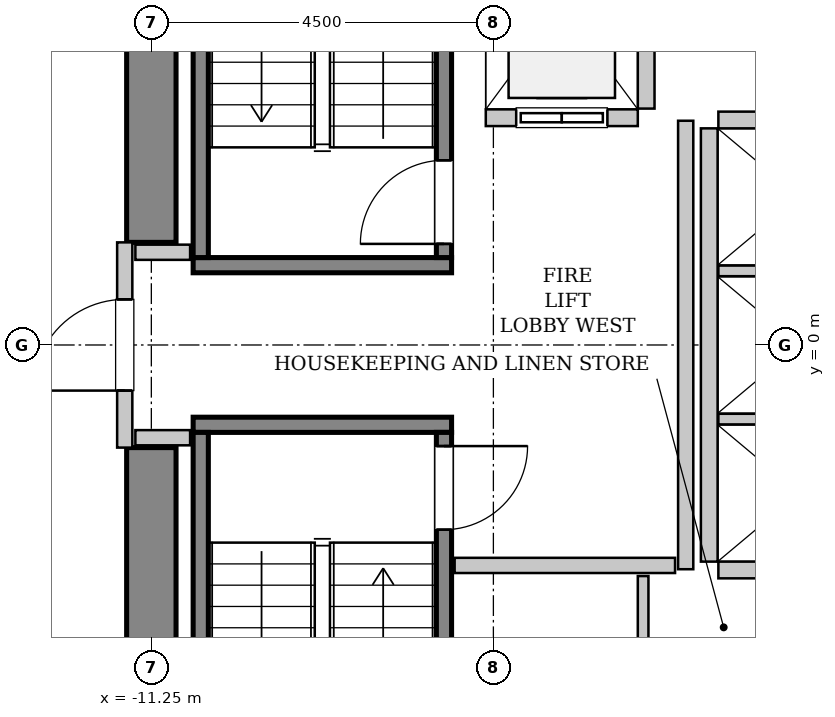
"""IFC4 building model, lengths in metres.
Left out: names, types, materials, properties, quantities, classifications, styles, units other than length and angle.
Written with IfcOpenShell. Run it as: python <this file> out.ifc"""

import sys

from ifc_helpers import new_model, si_unit, direction, frame, frame_2d, origin, place, context, subcontext, project, spatial, rectangle, extrude, source, transform, mapped, element, fill, save


model = new_model("IFC4")
c1 = context("Model", 3, precision=1e-05, world=origin(), true_north=direction((0.0, 1.0)))
c2 = subcontext(c1, "Body", "Model", "MODEL_VIEW")
j1 = project(units=[si_unit("LENGTHUNIT", "METRE"), si_unit("PLANEANGLEUNIT", "RADIAN")], contexts=[c1])
p1 = place(None, origin())
s1 = spatial("IfcSite", under=j1, at=p1, CompositionType="ELEMENT")
p2 = place(p1, origin())
s2 = spatial("IfcBuilding", under=s1, at=p2, CompositionType="ELEMENT")
p3 = place(p2, frame((0.0, 0.0, 74.8)))
s3 = spatial("IfcBuildingStorey", under=s2, at=p3, CompositionType="ELEMENT", Elevation=74.8)
m1 = source(origin(), c2, "Body", "SweptSolid", [
    extrude(rectangle(XDim=7.325, YDim=0.65, at=frame_2d((3.663, 0.0))), origin(), (0.0, 0.0, 1.0), 3.8),
])
for number, where, z_axis, x_axis in (
    (1, (-11.25, -8.675, 0.0), (0.0, 0.0, 1.0), (0.0, 1.0, 0.0)),
    (2, (-11.25, 1.35, 0.0), (0.0, 0.0, 1.0), (0.0, 1.0, 0.0)),
):
    element("IfcWall", number, at=place(p3, frame(where, z_axis=z_axis, x_axis=x_axis)), inside=s3, PredefinedType="SHEAR", context=c2, shape_type="MappedRepresentation", body=[
        mapped(m1, transform((0.0, 0.0, 0.0), x_axis=(1.0, 0.0, 0.0), y_axis=(0.0, 1.0, 0.0), z_axis=(0.0, 0.0, 1.0), scale=1.0)),
    ])
m2 = source(origin(), c2, "Body", "SweptSolid", [
    extrude(rectangle(XDim=3.4, YDim=0.2, at=frame_2d((1.7, 0.0))), origin(), (0.0, 0.0, 1.0), 3.8),
])
p4 = place(p3, frame((-7.3, 1.05, 0.0), z_axis=(0.0, 0.0, 1.0), x_axis=(-1.0, 0.0, 0.0)))
e3 = element("IfcWall", 3, at=p4, inside=s3, PredefinedType="SOLIDWALL", context=c2, shape_type="MappedRepresentation", body=[
    mapped(m2, transform((0.0, 0.0, 0.0), x_axis=(1.0, 0.0, 0.0), y_axis=(0.0, 1.0, 0.0), z_axis=(0.0, 0.0, 1.0), scale=1.0)),
])
m3 = source(origin(), c2, "Body", "SweptSolid", [
    extrude(rectangle(XDim=7.1, YDim=0.2, at=frame_2d((3.55, 0.0))), origin(), (0.0, 0.0, 1.0), 3.8),
])
p5 = place(p3, frame((-7.4, 1.15, 0.0), z_axis=(0.0, 0.0, 1.0), x_axis=(0.0, 1.0, 0.0)))
e4 = element("IfcWall", 4, at=p5, inside=s3, PredefinedType="SOLIDWALL", context=c2, shape_type="MappedRepresentation", body=[
    mapped(m3, transform((0.0, 0.0, 0.0), x_axis=(1.0, 0.0, 0.0), y_axis=(0.0, 1.0, 0.0), z_axis=(0.0, 0.0, 1.0), scale=1.0)),
])
p6 = place(p5, frame((0.18, 0.0, 0.0)))
e5 = element("IfcOpeningElement", 5, at=p6, cuts=e4, PredefinedType="OPENING", context=c2, shape_type="SweptSolid", body=[
    extrude(rectangle(XDim=1.1, YDim=2.15, at=frame_2d((0.55, 1.075))), frame((0.0, 0.11, 0.0), z_axis=(0.0, -1.0, 0.0), x_axis=(1.0, 0.0, 0.0)), (0.0, 0.0, 1.0), 0.22),
])
p7 = place(p3, frame((-10.6, 1.15, 0.0), z_axis=(0.0, 0.0, 1.0), x_axis=(0.0, 1.0, 0.0)))
e6 = element("IfcWall", 6, at=p7, inside=s3, PredefinedType="SOLIDWALL", context=c2, shape_type="MappedRepresentation", body=[
    mapped(m3, transform((0.0, 0.0, 0.0), x_axis=(1.0, 0.0, 0.0), y_axis=(0.0, 1.0, 0.0), z_axis=(0.0, 0.0, 1.0), scale=1.0)),
])
p8 = place(p3, frame((-10.7, -1.05, 0.0), z_axis=(0.0, 0.0, 1.0), x_axis=(1.0, 0.0, 0.0)))
e7 = element("IfcWall", 7, at=p8, inside=s3, PredefinedType="SOLIDWALL", context=c2, shape_type="MappedRepresentation", body=[
    mapped(m2, transform((0.0, 0.0, 0.0), x_axis=(1.0, 0.0, 0.0), y_axis=(0.0, 1.0, 0.0), z_axis=(0.0, 0.0, 1.0), scale=1.0)),
])
p9 = place(p3, frame((-10.6, -1.15, 0.0), z_axis=(0.0, 0.0, 1.0), x_axis=(0.0, -1.0, 0.0)))
e8 = element("IfcWall", 8, at=p9, inside=s3, PredefinedType="SOLIDWALL", context=c2, shape_type="MappedRepresentation", body=[
    mapped(m3, transform((0.0, 0.0, 0.0), x_axis=(1.0, 0.0, 0.0), y_axis=(0.0, 1.0, 0.0), z_axis=(0.0, 0.0, 1.0), scale=1.0)),
])
p10 = place(p3, frame((-7.4, -1.15, 0.0), z_axis=(0.0, 0.0, 1.0), x_axis=(0.0, -1.0, 0.0)))
e9 = element("IfcWall", 9, at=p10, inside=s3, PredefinedType="SOLIDWALL", context=c2, shape_type="MappedRepresentation", body=[
    mapped(m3, transform((0.0, 0.0, 0.0), x_axis=(1.0, 0.0, 0.0), y_axis=(0.0, 1.0, 0.0), z_axis=(0.0, 0.0, 1.0), scale=1.0)),
])
p11 = place(p10, frame((0.18, 0.0, 0.0)))
e10 = element("IfcOpeningElement", 10, at=p11, cuts=e9, PredefinedType="OPENING", context=c2, shape_type="SweptSolid", body=[
    extrude(rectangle(XDim=1.1, YDim=2.15, at=frame_2d((0.55, 1.075))), frame((0.0, 0.11, 0.0), z_axis=(0.0, -1.0, 0.0), x_axis=(1.0, 0.0, 0.0)), (0.0, 0.0, 1.0), 0.22),
])
m4 = source(origin(), c2, "Body", "SweptSolid", [
    extrude(rectangle(XDim=2.0, YDim=0.22, at=frame_2d((1.0, 0.0))), origin(), (0.0, 0.0, 1.0), 3.535),
])
p12 = place(p3, frame((-6.85, 2.99, 0.0), z_axis=(0.0, 0.0, 1.0), x_axis=(1.0, 0.0, 0.0)))
e11 = element("IfcWall", 11, at=p12, inside=s3, PredefinedType="SOLIDWALL", context=c2, shape_type="MappedRepresentation", body=[
    mapped(m4, transform((0.0, 0.0, 0.0), x_axis=(1.0, 0.0, 0.0), y_axis=(0.0, 1.0, 0.0), z_axis=(0.0, 0.0, 1.0), scale=1.0)),
])
p13 = place(p12, frame((0.4, 0.0, 0.0)))
e12 = element("IfcOpeningElement", 12, at=p13, cuts=e11, PredefinedType="OPENING", context=c2, shape_type="SweptSolid", body=[
    extrude(rectangle(XDim=1.2, YDim=2.2, at=frame_2d((0.6, 1.1))), frame((0.0, 0.12, 0.0), z_axis=(0.0, -1.0, 0.0), x_axis=(1.0, 0.0, 0.0)), (0.0, 0.0, 1.0), 0.24),
])
m5 = source(origin(), c2, "Body", "SweptSolid", [
    extrude(rectangle(XDim=2.68, YDim=0.22, at=frame_2d((1.34, 0.0))), origin(), (0.0, 0.0, 1.0), 3.535),
])
p14 = place(p3, frame((-4.74, 3.11, 0.0), z_axis=(0.0, 0.0, 1.0), x_axis=(0.0, 1.0, 0.0)))
e13 = element("IfcWall", 13, at=p14, inside=s3, PredefinedType="SOLIDWALL", context=c2, shape_type="MappedRepresentation", body=[
    mapped(m5, transform((0.0, 0.0, 0.0), x_axis=(1.0, 0.0, 0.0), y_axis=(0.0, 1.0, 0.0), z_axis=(0.0, 0.0, 1.0), scale=1.0)),
])
m6 = source(origin(), c2, "Body", "SweptSolid", [
    extrude(rectangle(XDim=5.7, YDim=0.22, at=frame_2d((2.85, 0.0))), origin(), (0.0, 0.0, 1.0), 3.535),
])
p15 = place(p3, frame((-3.91, 2.85, 0.0), z_axis=(0.0, 0.0, 1.0), x_axis=(0.0, -1.0, 0.0)))
e14 = element("IfcWall", 14, at=p15, inside=s3, PredefinedType="SOLIDWALL", context=c2, shape_type="MappedRepresentation", body=[
    mapped(m6, transform((0.0, 0.0, 0.0), x_axis=(1.0, 0.0, 0.0), y_axis=(0.0, 1.0, 0.0), z_axis=(0.0, 0.0, 1.0), scale=1.0)),
])
m7 = source(origin(), c2, "Body", "SweptSolid", [
    extrude(rectangle(XDim=2.13, YDim=0.22, at=frame_2d((1.065, 0.0))), origin(), (0.0, 0.0, 1.0), 3.535),
])
p16 = place(p3, frame((-3.79, -2.96, 0.0), z_axis=(0.0, 0.0, 1.0), x_axis=(1.0, 0.0, 0.0)))
e15 = element("IfcWall", 15, at=p16, inside=s3, PredefinedType="SOLIDWALL", context=c2, shape_type="MappedRepresentation", body=[
    mapped(m7, transform((0.0, 0.0, 0.0), x_axis=(1.0, 0.0, 0.0), y_axis=(0.0, 1.0, 0.0), z_axis=(0.0, 0.0, 1.0), scale=1.0)),
])
m8 = source(origin(), c2, "Body", "SweptSolid", [
    extrude(rectangle(XDim=2.13, YDim=0.14, at=frame_2d((1.065, 0.0))), origin(), (0.0, 0.0, 1.0), 3.535),
])
for number, where, z_axis, x_axis in (
    (16, (-3.79, -0.975, 0.0), (0.0, 0.0, 1.0), (1.0, 0.0, 0.0)),
    (17, (-3.79, 0.975, 0.0), (0.0, 0.0, 1.0), (1.0, 0.0, 0.0)),
):
    element("IfcWall", number, at=place(p3, frame(where, z_axis=z_axis, x_axis=x_axis)), inside=s3, PredefinedType="PARTITIONING", context=c2, shape_type="MappedRepresentation", body=[
        mapped(m8, transform((0.0, 0.0, 0.0), x_axis=(1.0, 0.0, 0.0), y_axis=(0.0, 1.0, 0.0), z_axis=(0.0, 0.0, 1.0), scale=1.0)),
    ])
p17 = place(p3, frame((-1.66, 2.96, 0.0), z_axis=(0.0, 0.0, 1.0), x_axis=(-1.0, 0.0, 0.0)))
e18 = element("IfcWall", 18, at=p17, inside=s3, PredefinedType="SOLIDWALL", context=c2, shape_type="MappedRepresentation", body=[
    mapped(m7, transform((0.0, 0.0, 0.0), x_axis=(1.0, 0.0, 0.0), y_axis=(0.0, 1.0, 0.0), z_axis=(0.0, 0.0, 1.0), scale=1.0)),
])
m9 = source(origin(), c2, "Body", "SweptSolid", [
    extrude(rectangle(XDim=2.7, YDim=0.2, at=frame_2d((1.35, 0.0))), origin(), (0.0, 0.0, 1.0), 2.425),
])
p18 = place(p3, frame((-11.6, -1.35, 0.0), z_axis=(0.0, 0.0, 1.0), x_axis=(0.0, 1.0, 0.0)))
e19 = element("IfcWall", 19, at=p18, inside=s3, PredefinedType="PARTITIONING", context=c2, shape_type="MappedRepresentation", body=[
    mapped(m9, transform((0.0, 0.0, 0.0), x_axis=(1.0, 0.0, 0.0), y_axis=(0.0, 1.0, 0.0), z_axis=(0.0, 0.0, 1.0), scale=1.0)),
])
p19 = place(p18, frame((0.75, 0.0, 0.0)))
e20 = element("IfcOpeningElement", 20, at=p19, cuts=e19, PredefinedType="OPENING", context=c2, shape_type="SweptSolid", body=[
    extrude(rectangle(XDim=1.2, YDim=2.15, at=frame_2d((0.6, 1.075))), frame((0.0, 0.11, 0.0), z_axis=(0.0, -1.0, 0.0), x_axis=(1.0, 0.0, 0.0)), (0.0, 0.0, 1.0), 0.22),
])
m10 = source(origin(), c2, "Body", "SweptSolid", [
    extrude(rectangle(XDim=5.9, YDim=0.2, at=frame_2d((2.95, 0.0))), origin(), (0.0, 0.0, 1.0), 3.535),
])
p20 = place(p3, frame((-4.22, -2.95, 0.0), z_axis=(0.0, 0.0, 1.0), x_axis=(0.0, 1.0, 0.0)))
e21 = element("IfcWall", 21, at=p20, inside=s3, PredefinedType="PARTITIONING", context=c2, shape_type="MappedRepresentation", body=[
    mapped(m10, transform((0.0, 0.0, 0.0), x_axis=(1.0, 0.0, 0.0), y_axis=(0.0, 1.0, 0.0), z_axis=(0.0, 0.0, 1.0), scale=1.0)),
])
m11 = source(origin(), c2, "Body", "SweptSolid", [
    extrude(rectangle(XDim=2.9, YDim=0.2, at=frame_2d((1.45, 0.0))), origin(), (0.0, 0.0, 1.0), 3.535),
])
p21 = place(p3, frame((-7.26, -2.9, 0.0), z_axis=(0.0, 0.0, 1.0), x_axis=(1.0, 0.0, 0.0)))
e22 = element("IfcWall", 22, at=p21, inside=s3, PredefinedType="PARTITIONING", context=c2, shape_type="MappedRepresentation", body=[
    mapped(m11, transform((0.0, 0.0, 0.0), x_axis=(1.0, 0.0, 0.0), y_axis=(0.0, 1.0, 0.0), z_axis=(0.0, 0.0, 1.0), scale=1.0)),
])
m12 = source(origin(), c2, "Body", "SweptSolid", [
    extrude(rectangle(XDim=0.72, YDim=0.2, at=frame_2d((0.36, 0.0))), origin(), (0.0, 0.0, 1.0), 3.535),
])
for number, where, z_axis, x_axis in (
    (23, (-11.46, 1.22, 0.0), (0.0, 0.0, 1.0), (1.0, 0.0, 0.0)),
    (24, (-11.46, -1.22, 0.0), (0.0, 0.0, 1.0), (1.0, 0.0, 0.0)),
):
    element("IfcWall", number, at=place(p3, frame(where, z_axis=z_axis, x_axis=x_axis)), inside=s3, PredefinedType="PARTITIONING", context=c2, shape_type="MappedRepresentation", body=[
        mapped(m12, transform((0.0, 0.0, 0.0), x_axis=(1.0, 0.0, 0.0), y_axis=(0.0, 1.0, 0.0), z_axis=(0.0, 0.0, 1.0), scale=1.0)),
    ])
m13 = source(origin(), c2, "Body", "SweptSolid", [
    extrude(rectangle(XDim=1.26, YDim=0.14, at=frame_2d((0.63, 0.0))), origin(), (0.0, 0.0, 1.0), 3.535),
])
p22 = place(p3, frame((-4.78, -4.3, 0.0), z_axis=(0.0, 0.0, 1.0), x_axis=(0.0, 1.0, 0.0)))
e25 = element("IfcWall", 25, at=p22, inside=s3, PredefinedType="PARTITIONING", context=c2, shape_type="MappedRepresentation", body=[
    mapped(m13, transform((0.0, 0.0, 0.0), x_axis=(1.0, 0.0, 0.0), y_axis=(0.0, 1.0, 0.0), z_axis=(0.0, 0.0, 1.0), scale=1.0)),
])
m14 = source(origin(), c2, "Body", "SweptSolid", [
    extrude(rectangle(XDim=1.1, YDim=2.15, at=frame_2d((0.55, 1.075))), frame((0.0, 0.025, 0.0), z_axis=(0.0, -1.0, 0.0), x_axis=(1.0, 0.0, 0.0)), (0.0, 0.0, 1.0), 0.05),
])
p23 = place(p6, origin())
e26 = element("IfcDoor", 26, at=p23, inside=s3, OperationType="SINGLE_SWING_LEFT", PredefinedType="DOOR", context=c2, shape_type="MappedRepresentation", body=[
    mapped(m14, transform((0.0, 0.0, 0.0), x_axis=(1.0, 0.0, 0.0), y_axis=(0.0, 1.0, 0.0), z_axis=(0.0, 0.0, 1.0), scale=1.0)),
])
fill(e5, e26)
p24 = place(p11, origin())
e27 = element("IfcDoor", 27, at=p24, inside=s3, OperationType="SINGLE_SWING_LEFT", PredefinedType="DOOR", context=c2, shape_type="MappedRepresentation", body=[
    mapped(m14, transform((0.0, 0.0, 0.0), x_axis=(1.0, 0.0, 0.0), y_axis=(0.0, 1.0, 0.0), z_axis=(0.0, 0.0, 1.0), scale=1.0)),
])
fill(e10, e27)
m15 = source(origin(), c2, "Body", "SweptSolid", [
    extrude(rectangle(XDim=1.2, YDim=2.2, at=frame_2d((0.6, 1.1))), frame((0.0, 0.025, 0.0), z_axis=(0.0, -1.0, 0.0), x_axis=(1.0, 0.0, 0.0)), (0.0, 0.0, 1.0), 0.05),
])
p25 = place(p13, origin())
e28 = element("IfcDoor", 28, at=p25, inside=s3, OperationType="SLIDING_TO_LEFT", PredefinedType="DOOR", context=c2, shape_type="MappedRepresentation", body=[
    mapped(m15, transform((0.0, 0.0, 0.0), x_axis=(1.0, 0.0, 0.0), y_axis=(0.0, 1.0, 0.0), z_axis=(0.0, 0.0, 1.0), scale=1.0)),
])
fill(e12, e28)
m16 = source(origin(), c2, "Body", "SweptSolid", [
    extrude(rectangle(XDim=1.2, YDim=2.15, at=frame_2d((0.6, 1.075))), frame((0.0, 0.025, 0.0), z_axis=(0.0, -1.0, 0.0), x_axis=(1.0, 0.0, 0.0)), (0.0, 0.0, 1.0), 0.05),
])
p26 = place(p19, origin())
e29 = element("IfcDoor", 29, at=p26, inside=s3, OperationType="SINGLE_SWING_LEFT", PredefinedType="DOOR", context=c2, shape_type="MappedRepresentation", body=[
    mapped(m16, transform((0.0, 0.0, 0.0), x_axis=(1.0, 0.0, 0.0), y_axis=(0.0, 1.0, 0.0), z_axis=(0.0, 0.0, 1.0), scale=1.0)),
])
fill(e20, e29)
save(model, sys.argv[1])
